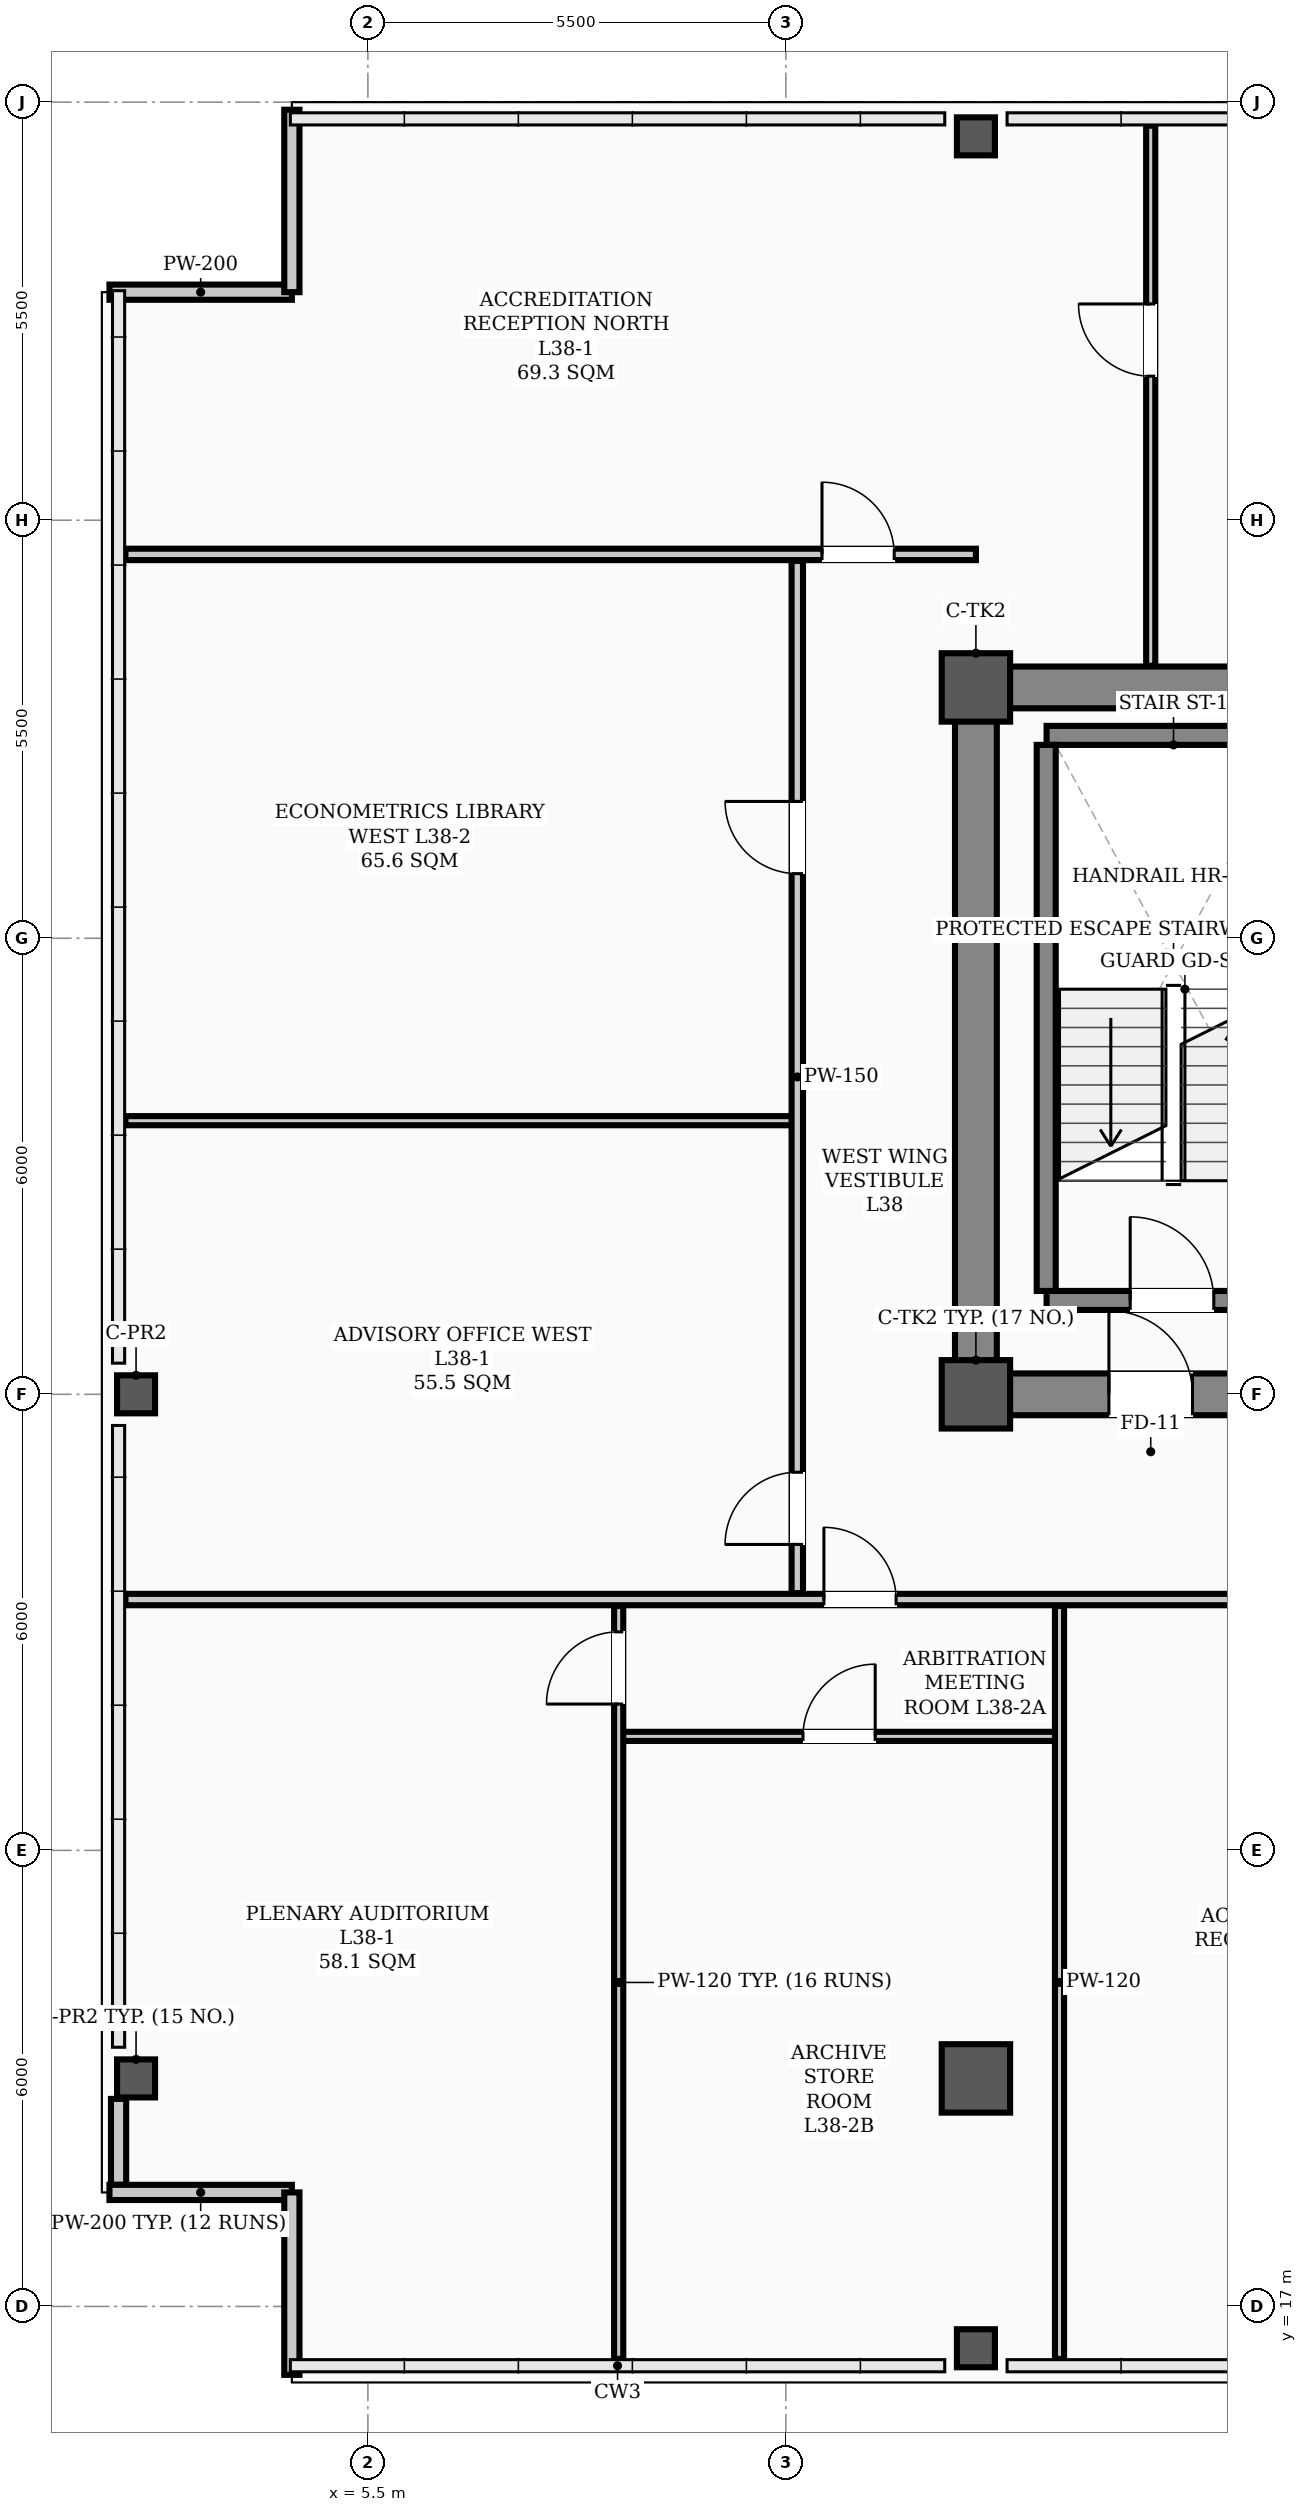
"""IFC4 building model, lengths in metres.
Left out: names, types, materials, properties, quantities, classifications, styles, units other than length and angle.
Written with IfcOpenShell. Run it as: python <this file> out.ifc"""

import sys

from ifc_helpers import new_model, si_unit, direction, frame, frame_2d, origin, origin_2d, place, context, subcontext, project, spatial, rectangle, hollow_rectangle, extrude, element, fill, save


model = new_model("IFC4")
c1 = context("Model", 3, precision=1e-05, world=origin(), true_north=direction((0.0, 1.0)))
c2 = subcontext(c1, "Body", "Model", "MODEL_VIEW")
j1 = project(units=[si_unit("LENGTHUNIT", "METRE"), si_unit("PLANEANGLEUNIT", "RADIAN")], contexts=[c1])
p1 = place(None, origin())
s1 = spatial("IfcSite", under=j1, at=p1, CompositionType="ELEMENT")
p2 = place(p1, origin())
s2 = spatial("IfcBuilding", under=s1, at=p2, CompositionType="ELEMENT")
p3 = place(p2, frame((0.0, 0.0, 153.9)))
s3 = spatial("IfcBuildingStorey", under=s2, at=p3, CompositionType="ELEMENT", Elevation=153.9)
for number, where, z_axis, x_axis in (
    (1, (13.5, 29.0, 0.0), (0.0, 0.0, 1.0), (1.0, 0.0, 0.0)),
    (2, (13.5, 38.3, 0.0), (0.0, 0.0, 1.0), (1.0, 0.0, 0.0)),
    (3, (13.5, 20.0, 0.0), (0.0, 0.0, 1.0), (1.0, 0.0, 0.0)),
):
    element("IfcColumn", number, at=place(p3, frame(where, z_axis=z_axis, x_axis=x_axis)), inside=s3, PredefinedType="COLUMN", context=c2, shape_type="SweptSolid", body=[
        extrude(hollow_rectangle(XDim=0.9, YDim=0.9, WallThickness=0.035, InnerFilletRadius=0.017, OuterFilletRadius=0.052, at=origin_2d()), origin(), (0.0, 0.0, 1.0), 3.9),
    ])
for number, where, z_axis, x_axis in (
    (4, (2.45, 20.0, 0.0), (0.0, 0.0, 1.0), (1.0, 0.0, 0.0)),
    (5, (2.45, 29.0, 0.0), (0.0, 0.0, 1.0), (1.0, 0.0, 0.0)),
    (6, (13.5, 16.45, 0.0), (0.0, 0.0, 1.0), (1.0, 0.0, 0.0)),
    (7, (13.5, 45.55, 0.0), (0.0, 0.0, 1.0), (1.0, 0.0, 0.0)),
):
    element("IfcColumn", number, at=place(p3, frame(where, z_axis=z_axis, x_axis=x_axis)), inside=s3, PredefinedType="COLUMN", context=c2, shape_type="SweptSolid", body=[
        extrude(hollow_rectangle(XDim=0.5, YDim=0.5, WallThickness=0.024, InnerFilletRadius=0.012, OuterFilletRadius=0.036, at=origin_2d()), origin(), (0.0, 0.0, 1.0), 3.9),
    ])
p4 = place(p3, frame((2.22, 18.6, 0.0), z_axis=(0.0, 0.0, 1.0), x_axis=(0.0, 1.0, 0.0)))
e8 = element("IfcWall", 8, at=p4, inside=s3, PredefinedType="PARAPET", context=c2, shape_type="SweptSolid", body=[
    extrude(rectangle(XDim=1.13, YDim=0.2, at=frame_2d((0.565, 0.0))), origin(), (0.0, 0.0, 1.0), 1.2),
])
for number, where, z_axis, x_axis in (
    (9, (2.1, 18.5, 0.0), (0.0, 0.0, 1.0), (1.0, 0.0, 0.0)),
    (10, (4.5, 18.5, 0.0), (0.0, 0.0, 1.0), (0.0, -1.0, 0.0)),
    (11, (2.1, 43.5, 0.0), (0.0, 0.0, 1.0), (1.0, 0.0, 0.0)),
    (12, (4.5, 43.5, 0.0), (0.0, 0.0, 1.0), (0.0, 1.0, 0.0)),
):
    element("IfcWall", number, at=place(p3, frame(where, z_axis=z_axis, x_axis=x_axis)), inside=s3, PredefinedType="PARAPET", context=c2, shape_type="SweptSolid", body=[
        extrude(rectangle(XDim=2.4, YDim=0.2, at=frame_2d((1.2, 0.0))), origin(), (0.0, 0.0, 1.0), 1.2),
    ])
p5 = place(p3, frame((13.5, 29.0, 0.0), z_axis=(0.0, 0.0, 1.0), x_axis=(1.0, 0.0, 0.0)))
e13 = element("IfcWall", 13, at=p5, inside=s3, PredefinedType="SHEAR", context=c2, shape_type="SweptSolid", body=[
    extrude(rectangle(XDim=30.5, YDim=0.55, at=frame_2d((15.25, 0.0))), origin(), (0.0, 0.0, 1.0), 3.72),
])
p6 = place(p5, frame((1.75, 0.0, 0.0)))
e14 = element("IfcOpeningElement", 14, at=p6, cuts=e13, PredefinedType="OPENING", context=c2, shape_type="SweptSolid", body=[
    extrude(rectangle(XDim=1.1, YDim=2.08, at=frame_2d((0.55, 1.04))), frame((0.0, 0.285, 0.0), z_axis=(0.0, -1.0, 0.0), x_axis=(1.0, 0.0, 0.0)), (0.0, 0.0, 1.0), 0.57),
])
p7 = place(p5, frame((26.7, 0.0, 0.0)))
e15 = element("IfcOpeningElement", 15, at=p7, cuts=e13, PredefinedType="OPENING", context=c2, shape_type="SweptSolid", body=[
    extrude(rectangle(XDim=1.1, YDim=2.08, at=frame_2d((0.55, 1.04))), frame((0.0, 0.285, 0.0), z_axis=(0.0, -1.0, 0.0), x_axis=(1.0, 0.0, 0.0)), (0.0, 0.0, 1.0), 0.57),
])
p8 = place(p5, frame((6.8, 0.0, 0.0)))
e16 = element("IfcOpeningElement", 16, at=p8, cuts=e13, PredefinedType="OPENING", context=c2, shape_type="SweptSolid", body=[
    extrude(rectangle(XDim=1.1, YDim=2.08, at=frame_2d((0.55, 1.04))), frame((0.0, 0.285, 0.0), z_axis=(0.0, -1.0, 0.0), x_axis=(1.0, 0.0, 0.0)), (0.0, 0.0, 1.0), 0.57),
])
p9 = place(p5, frame((13.2, 0.0, 0.0)))
e17 = element("IfcOpeningElement", 17, at=p9, cuts=e13, PredefinedType="OPENING", context=c2, shape_type="SweptSolid", body=[
    extrude(rectangle(XDim=1.6, YDim=2.08, at=frame_2d((0.8, 1.04))), frame((0.0, 0.285, 0.0), z_axis=(0.0, -1.0, 0.0), x_axis=(1.0, 0.0, 0.0)), (0.0, 0.0, 1.0), 0.57),
])
p10 = place(p5, frame((20.525, 0.0, 0.0)))
e18 = element("IfcOpeningElement", 18, at=p10, cuts=e13, PredefinedType="OPENING", context=c2, shape_type="SweptSolid", body=[
    extrude(rectangle(XDim=0.95, YDim=2.08, at=frame_2d((0.475, 1.04))), frame((0.0, 0.285, 0.0), z_axis=(0.0, -1.0, 0.0), x_axis=(1.0, 0.0, 0.0)), (0.0, 0.0, 1.0), 0.57),
])
p11 = place(p3, frame((13.5, 38.3, 0.0), z_axis=(0.0, 0.0, 1.0), x_axis=(1.0, 0.0, 0.0)))
e19 = element("IfcWall", 19, at=p11, inside=s3, PredefinedType="SHEAR", context=c2, shape_type="SweptSolid", body=[
    extrude(rectangle(XDim=30.5, YDim=0.55, at=frame_2d((15.25, 0.0))), origin(), (0.0, 0.0, 1.0), 3.72),
])
p12 = place(p3, frame((13.5, 29.35, 0.0), z_axis=(0.0, 0.0, 1.0), x_axis=(0.0, 1.0, 0.0)))
e20 = element("IfcWall", 20, at=p12, inside=s3, PredefinedType="SHEAR", context=c2, shape_type="SweptSolid", body=[
    extrude(rectangle(XDim=8.6, YDim=0.55, at=frame_2d((4.3, 0.0))), origin(), (0.0, 0.0, 1.0), 3.72),
])
p13 = place(p3, frame((14.43, 30.235, 0.0), z_axis=(0.0, 0.0, 1.0), x_axis=(1.0, 0.0, 0.0)))
e21 = element("IfcWall", 21, at=p13, inside=s3, PredefinedType="STANDARD", context=c2, shape_type="SweptSolid", body=[
    extrude(rectangle(XDim=3.34, YDim=0.25, at=frame_2d((1.67, 0.0))), origin(), (0.0, 0.0, 1.0), 3.72),
])
p14 = place(p13, frame((1.1, 0.0, 0.0)))
e22 = element("IfcOpeningElement", 22, at=p14, cuts=e21, PredefinedType="OPENING", context=c2, shape_type="SweptSolid", body=[
    extrude(rectangle(XDim=1.1, YDim=2.08, at=frame_2d((0.55, 1.04))), frame((0.0, 0.135, 0.0), z_axis=(0.0, -1.0, 0.0), x_axis=(1.0, 0.0, 0.0)), (0.0, 0.0, 1.0), 0.27),
])
p15 = place(p3, frame((14.43, 37.669, 0.0), z_axis=(0.0, 0.0, 1.0), x_axis=(1.0, 0.0, 0.0)))
e23 = element("IfcWall", 23, at=p15, inside=s3, PredefinedType="STANDARD", context=c2, shape_type="SweptSolid", body=[
    extrude(rectangle(XDim=3.34, YDim=0.25, at=frame_2d((1.67, 0.0))), origin(), (0.0, 0.0, 1.0), 3.72),
])
p16 = place(p3, frame((14.425, 30.36, 0.0), z_axis=(0.0, 0.0, 1.0), x_axis=(0.0, 1.0, 0.0)))
e24 = element("IfcWall", 24, at=p16, inside=s3, PredefinedType="STANDARD", context=c2, shape_type="SweptSolid", body=[
    extrude(rectangle(XDim=7.184, YDim=0.25, at=frame_2d((3.592, 0.0))), origin(), (0.0, 0.0, 1.0), 3.72),
])
p17 = place(p3, frame((2.31, 26.3, 0.0), z_axis=(0.0, 0.0, 1.0), x_axis=(1.0, 0.0, 0.0)))
e25 = element("IfcWall", 25, at=p17, inside=s3, PredefinedType="PARTITIONING", context=c2, shape_type="SweptSolid", body=[
    extrude(rectangle(XDim=46.38, YDim=0.15, at=frame_2d((23.19, 0.0))), origin(), (0.0, 0.0, 1.0), 3.2),
])
p18 = place(p17, frame((9.19, 0.0, 0.0)))
e26 = element("IfcOpeningElement", 26, at=p18, cuts=e25, PredefinedType="OPENING", context=c2, shape_type="SweptSolid", body=[
    extrude(rectangle(XDim=0.95, YDim=2.08, at=frame_2d((0.475, 1.04))), frame((0.0, 0.085, 0.0), z_axis=(0.0, -1.0, 0.0), x_axis=(1.0, 0.0, 0.0)), (0.0, 0.0, 1.0), 0.17),
])
p19 = place(p17, frame((14.815, 0.0, 0.0)))
e27 = element("IfcOpeningElement", 27, at=p19, cuts=e25, PredefinedType="OPENING", context=c2, shape_type="SweptSolid", body=[
    extrude(rectangle(XDim=0.95, YDim=2.08, at=frame_2d((0.475, 1.04))), frame((0.0, 0.085, 0.0), z_axis=(0.0, -1.0, 0.0), x_axis=(1.0, 0.0, 0.0)), (0.0, 0.0, 1.0), 0.17),
])
p20 = place(p17, frame((19.015, 0.0, 0.0)))
e28 = element("IfcOpeningElement", 28, at=p20, cuts=e25, PredefinedType="OPENING", context=c2, shape_type="SweptSolid", body=[
    extrude(rectangle(XDim=0.95, YDim=2.08, at=frame_2d((0.475, 1.04))), frame((0.0, 0.085, 0.0), z_axis=(0.0, -1.0, 0.0), x_axis=(1.0, 0.0, 0.0)), (0.0, 0.0, 1.0), 0.17),
])
p21 = place(p17, frame((26.315, 0.0, 0.0)))
e29 = element("IfcOpeningElement", 29, at=p21, cuts=e25, PredefinedType="OPENING", context=c2, shape_type="SweptSolid", body=[
    extrude(rectangle(XDim=0.95, YDim=2.08, at=frame_2d((0.475, 1.04))), frame((0.0, 0.085, 0.0), z_axis=(0.0, -1.0, 0.0), x_axis=(1.0, 0.0, 0.0)), (0.0, 0.0, 1.0), 0.17),
])
p22 = place(p17, frame((32.915, 0.0, 0.0)))
e30 = element("IfcOpeningElement", 30, at=p22, cuts=e25, PredefinedType="OPENING", context=c2, shape_type="SweptSolid", body=[
    extrude(rectangle(XDim=0.95, YDim=2.08, at=frame_2d((0.475, 1.04))), frame((0.0, 0.085, 0.0), z_axis=(0.0, -1.0, 0.0), x_axis=(1.0, 0.0, 0.0)), (0.0, 0.0, 1.0), 0.17),
])
p23 = place(p17, frame((38.065, 0.0, 0.0)))
e31 = element("IfcOpeningElement", 31, at=p23, cuts=e25, PredefinedType="OPENING", context=c2, shape_type="SweptSolid", body=[
    extrude(rectangle(XDim=0.95, YDim=2.08, at=frame_2d((0.475, 1.04))), frame((0.0, 0.085, 0.0), z_axis=(0.0, -1.0, 0.0), x_axis=(1.0, 0.0, 0.0)), (0.0, 0.0, 1.0), 0.17),
])
p24 = place(p3, frame((8.8, 24.5, 0.0), z_axis=(0.0, 0.0, 1.0), x_axis=(1.0, 0.0, 0.0)))
e32 = element("IfcWall", 32, at=p24, inside=s3, PredefinedType="PARTITIONING", context=c2, shape_type="SweptSolid", body=[
    extrude(rectangle(XDim=5.8, YDim=0.12, at=frame_2d((2.9, 0.0))), origin(), (0.0, 0.0, 1.0), 3.2),
])
p25 = place(p24, frame((2.425, 0.0, 0.0)))
e33 = element("IfcOpeningElement", 33, at=p25, cuts=e32, PredefinedType="OPENING", context=c2, shape_type="SweptSolid", body=[
    extrude(rectangle(XDim=0.95, YDim=2.08, at=frame_2d((0.475, 1.04))), frame((0.0, 0.07, 0.0), z_axis=(0.0, -1.0, 0.0), x_axis=(1.0, 0.0, 0.0)), (0.0, 0.0, 1.0), 0.14),
])
p26 = place(p3, frame((2.31, 32.6, 0.0), z_axis=(0.0, 0.0, 1.0), x_axis=(1.0, 0.0, 0.0)))
e34 = element("IfcWall", 34, at=p26, inside=s3, PredefinedType="PARTITIONING", context=c2, shape_type="SweptSolid", body=[
    extrude(rectangle(XDim=8.84, YDim=0.12, at=frame_2d((4.42, 0.0))), origin(), (0.0, 0.0, 1.0), 3.72),
])
p27 = place(p3, frame((2.31, 40.05, 0.0), z_axis=(0.0, 0.0, 1.0), x_axis=(1.0, 0.0, 0.0)))
e35 = element("IfcWall", 35, at=p27, inside=s3, PredefinedType="PARTITIONING", context=c2, shape_type="SweptSolid", body=[
    extrude(rectangle(XDim=11.19, YDim=0.15, at=frame_2d((5.595, 0.0))), origin(), (0.0, 0.0, 1.0), 3.2),
])
p28 = place(p27, frame((9.165, 0.0, 0.0)))
e36 = element("IfcOpeningElement", 36, at=p28, cuts=e35, PredefinedType="OPENING", context=c2, shape_type="SweptSolid", body=[
    extrude(rectangle(XDim=0.95, YDim=2.08, at=frame_2d((0.475, 1.04))), frame((0.0, 0.085, 0.0), z_axis=(0.0, -1.0, 0.0), x_axis=(1.0, 0.0, 0.0)), (0.0, 0.0, 1.0), 0.17),
])
p29 = place(p3, frame((11.15, 26.385, 0.0), z_axis=(0.0, 0.0, 1.0), x_axis=(0.0, 1.0, 0.0)))
e37 = element("IfcWall", 37, at=p29, inside=s3, PredefinedType="PARTITIONING", context=c2, shape_type="SweptSolid", body=[
    extrude(rectangle(XDim=13.58, YDim=0.15, at=frame_2d((6.79, 0.0))), origin(), (0.0, 0.0, 1.0), 3.1),
])
p30 = place(p29, frame((0.64, 0.0, 0.0)))
e38 = element("IfcOpeningElement", 38, at=p30, cuts=e37, PredefinedType="OPENING", context=c2, shape_type="SweptSolid", body=[
    extrude(rectangle(XDim=0.95, YDim=2.08, at=frame_2d((0.475, 1.04))), frame((0.0, 0.085, 0.0), z_axis=(0.0, -1.0, 0.0), x_axis=(1.0, 0.0, 0.0)), (0.0, 0.0, 1.0), 0.17),
])
p31 = place(p29, frame((9.465, 0.0, 0.0)))
e39 = element("IfcOpeningElement", 39, at=p31, cuts=e37, PredefinedType="OPENING", context=c2, shape_type="SweptSolid", body=[
    extrude(rectangle(XDim=0.95, YDim=2.08, at=frame_2d((0.475, 1.04))), frame((0.0, 0.085, 0.0), z_axis=(0.0, -1.0, 0.0), x_axis=(1.0, 0.0, 0.0)), (0.0, 0.0, 1.0), 0.17),
])
p32 = place(p3, frame((8.8, 16.31, 0.0), z_axis=(0.0, 0.0, 1.0), x_axis=(0.0, 1.0, 0.0)))
e40 = element("IfcWall", 40, at=p32, inside=s3, PredefinedType="PARTITIONING", context=c2, shape_type="SweptSolid", body=[
    extrude(rectangle(XDim=9.905, YDim=0.12, at=frame_2d((4.953, 0.0))), origin(), (0.0, 0.0, 1.0), 3.1),
])
p33 = place(p32, frame((8.615, 0.0, 0.0)))
e41 = element("IfcOpeningElement", 41, at=p33, cuts=e40, PredefinedType="OPENING", context=c2, shape_type="SweptSolid", body=[
    extrude(rectangle(XDim=0.95, YDim=2.08, at=frame_2d((0.475, 1.04))), frame((0.0, 0.07, 0.0), z_axis=(0.0, -1.0, 0.0), x_axis=(1.0, 0.0, 0.0)), (0.0, 0.0, 1.0), 0.14),
])
p34 = place(p3, frame((14.6, 16.31, 0.0), z_axis=(0.0, 0.0, 1.0), x_axis=(0.0, 1.0, 0.0)))
e42 = element("IfcWall", 42, at=p34, inside=s3, PredefinedType="PARTITIONING", context=c2, shape_type="SweptSolid", body=[
    extrude(rectangle(XDim=9.905, YDim=0.12, at=frame_2d((4.953, 0.0))), origin(), (0.0, 0.0, 1.0), 3.1),
])
p35 = place(p3, frame((15.8, 38.585, 0.0), z_axis=(0.0, 0.0, 1.0), x_axis=(0.0, 1.0, 0.0)))
e43 = element("IfcWall", 43, at=p35, inside=s3, PredefinedType="PARTITIONING", context=c2, shape_type="SweptSolid", body=[
    extrude(rectangle(XDim=7.105, YDim=0.12, at=frame_2d((3.552, 0.0))), origin(), (0.0, 0.0, 1.0), 3.212),
])
p36 = place(p35, frame((3.81, 0.0, 0.0)))
e44 = element("IfcOpeningElement", 44, at=p36, cuts=e43, PredefinedType="OPENING", context=c2, shape_type="SweptSolid", body=[
    extrude(rectangle(XDim=0.95, YDim=2.08, at=frame_2d((0.475, 1.04))), frame((0.0, 0.07, 0.0), z_axis=(0.0, -1.0, 0.0), x_axis=(1.0, 0.0, 0.0)), (0.0, 0.0, 1.0), 0.14),
])
p37 = place(p14, origin())
e45 = element("IfcDoor", 45, at=p37, inside=s3, OperationType="SINGLE_SWING_LEFT", PredefinedType="DOOR", context=c2, shape_type="SweptSolid", body=[
    extrude(rectangle(XDim=1.1, YDim=2.08, at=frame_2d((0.55, 1.04))), frame((0.0, 0.025, 0.0), z_axis=(0.0, -1.0, 0.0), x_axis=(1.0, 0.0, 0.0)), (0.0, 0.0, 1.0), 0.05),
])
fill(e22, e45)
p38 = place(p6, origin())
e46 = element("IfcDoor", 46, at=p38, inside=s3, OperationType="SINGLE_SWING_LEFT", PredefinedType="DOOR", context=c2, shape_type="SweptSolid", body=[
    extrude(rectangle(XDim=1.1, YDim=2.08, at=frame_2d((0.55, 1.04))), frame((0.0, 0.025, 0.0), z_axis=(0.0, -1.0, 0.0), x_axis=(1.0, 0.0, 0.0)), (0.0, 0.0, 1.0), 0.05),
])
fill(e14, e46)
p39 = place(p33, origin())
e47 = element("IfcDoor", 47, at=p39, inside=s3, OperationType="SINGLE_SWING_LEFT", PredefinedType="DOOR", context=c2, shape_type="SweptSolid", body=[
    extrude(rectangle(XDim=0.95, YDim=2.08, at=frame_2d((0.475, 1.04))), frame((0.0, 0.025, 0.0), z_axis=(0.0, -1.0, 0.0), x_axis=(1.0, 0.0, 0.0)), (0.0, 0.0, 1.0), 0.05),
])
fill(e41, e47)
p40 = place(p25, origin())
e48 = element("IfcDoor", 48, at=p40, inside=s3, OperationType="SINGLE_SWING_RIGHT", PredefinedType="DOOR", context=c2, shape_type="SweptSolid", body=[
    extrude(rectangle(XDim=0.95, YDim=2.08, at=frame_2d((0.475, 1.04))), frame((0.0, 0.025, 0.0), z_axis=(0.0, -1.0, 0.0), x_axis=(1.0, 0.0, 0.0)), (0.0, 0.0, 1.0), 0.05),
])
fill(e33, e48)
p41 = place(p18, origin())
e49 = element("IfcDoor", 49, at=p41, inside=s3, OperationType="SINGLE_SWING_LEFT", PredefinedType="DOOR", context=c2, shape_type="SweptSolid", body=[
    extrude(rectangle(XDim=0.95, YDim=2.08, at=frame_2d((0.475, 1.04))), frame((0.0, 0.025, 0.0), z_axis=(0.0, -1.0, 0.0), x_axis=(1.0, 0.0, 0.0)), (0.0, 0.0, 1.0), 0.05),
])
fill(e26, e49)
p42 = place(p30, origin())
e50 = element("IfcDoor", 50, at=p42, inside=s3, OperationType="SINGLE_SWING_LEFT", PredefinedType="DOOR", context=c2, shape_type="SweptSolid", body=[
    extrude(rectangle(XDim=0.95, YDim=2.08, at=frame_2d((0.475, 1.04))), frame((0.0, 0.025, 0.0), z_axis=(0.0, -1.0, 0.0), x_axis=(1.0, 0.0, 0.0)), (0.0, 0.0, 1.0), 0.05),
])
fill(e38, e50)
p43 = place(p31, origin())
e51 = element("IfcDoor", 51, at=p43, inside=s3, OperationType="SINGLE_SWING_RIGHT", PredefinedType="DOOR", context=c2, shape_type="SweptSolid", body=[
    extrude(rectangle(XDim=0.95, YDim=2.08, at=frame_2d((0.475, 1.04))), frame((0.0, 0.025, 0.0), z_axis=(0.0, -1.0, 0.0), x_axis=(1.0, 0.0, 0.0)), (0.0, 0.0, 1.0), 0.05),
])
fill(e39, e51)
p44 = place(p28, origin())
e52 = element("IfcDoor", 52, at=p44, inside=s3, OperationType="SINGLE_SWING_LEFT", PredefinedType="DOOR", context=c2, shape_type="SweptSolid", body=[
    extrude(rectangle(XDim=0.95, YDim=2.08, at=frame_2d((0.475, 1.04))), frame((0.0, 0.025, 0.0), z_axis=(0.0, -1.0, 0.0), x_axis=(1.0, 0.0, 0.0)), (0.0, 0.0, 1.0), 0.05),
])
fill(e36, e52)
p45 = place(p36, origin())
e53 = element("IfcDoor", 53, at=p45, inside=s3, OperationType="SINGLE_SWING_RIGHT", PredefinedType="DOOR", context=c2, shape_type="SweptSolid", body=[
    extrude(rectangle(XDim=0.95, YDim=2.08, at=frame_2d((0.475, 1.04))), frame((0.0, 0.025, 0.0), z_axis=(0.0, -1.0, 0.0), x_axis=(1.0, 0.0, 0.0)), (0.0, 0.0, 1.0), 0.05),
])
fill(e44, e53)
save(model, sys.argv[1])
